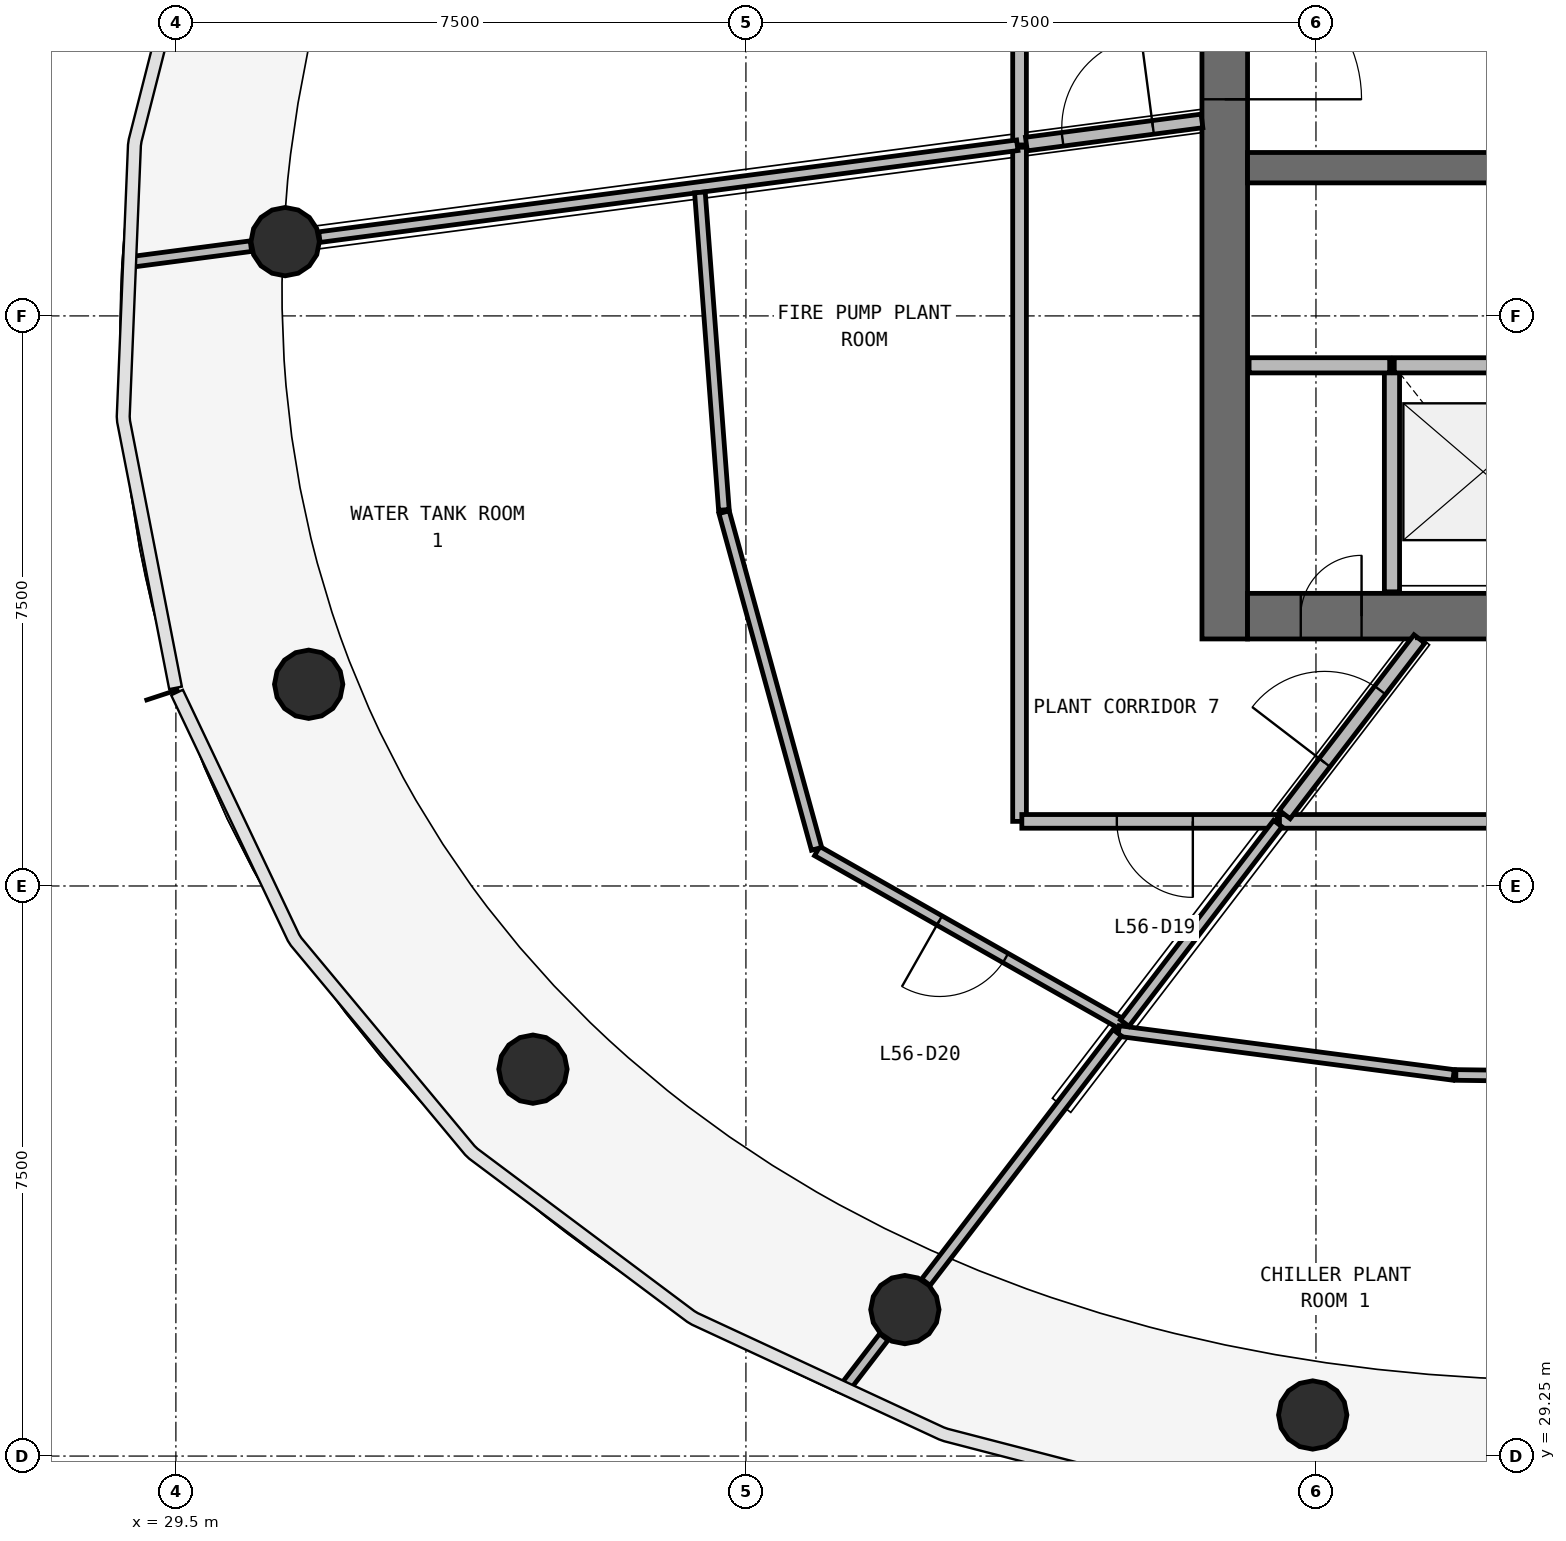
"""IFC4 building model, lengths in metres.
Left out: names, types, materials, properties, quantities, classifications, styles, units other than length and angle.
Written with IfcOpenShell. Run it as: python <this file> out.ifc"""

import sys

from ifc_helpers import new_model, si_unit, direction, frame, frame_2d, origin, origin_2d, place, context, subcontext, project, spatial, rectangle, circle, extrude, source, transform, mapped, element, fill, save


model = new_model("IFC4")
c1 = context("Model", 3, precision=1e-05, world=origin(), true_north=direction((0.0, 1.0)))
c2 = subcontext(c1, "Body", "Model", "MODEL_VIEW")
j1 = project(units=[si_unit("LENGTHUNIT", "METRE"), si_unit("PLANEANGLEUNIT", "RADIAN")], contexts=[c1])
p1 = place(None, origin())
s1 = spatial("IfcSite", under=j1, at=p1, CompositionType="ELEMENT")
p2 = place(p1, origin())
s2 = spatial("IfcBuilding", under=s1, at=p2, CompositionType="ELEMENT")
p3 = place(p2, frame((0.0, 0.0, 230.6)))
s3 = spatial("IfcBuildingStorey", under=s2, at=p3, CompositionType="ELEMENT", Elevation=230.6)
p4 = place(p3, frame((43.3, 56.0, 0.0), z_axis=(0.0, 0.0, 1.0), x_axis=(0.0, -1.0, 0.0)))
e1 = element("IfcWall", 1, at=p4, inside=s3, PredefinedType="SHEAR", context=c2, shape_type="SweptSolid", body=[
    extrude(rectangle(XDim=16.0, YDim=0.6, at=frame_2d((8.0, 0.0))), origin(), (0.0, 0.0, 1.0), 3.9),
])
p5 = place(p4, frame((7.1, 0.0, 0.0)))
e2 = element("IfcOpeningElement", 2, at=p5, cuts=e1, PredefinedType="OPENING", context=c2, shape_type="SweptSolid", body=[
    extrude(rectangle(XDim=1.8, YDim=2.1, at=frame_2d((0.9, 1.05))), frame((0.0, 0.31, 0.0), z_axis=(0.0, -1.0, 0.0), x_axis=(1.0, 0.0, 0.0)), (0.0, 0.0, 1.0), 0.62),
])
p6 = place(p3, frame((43.6, 40.3, 0.0), z_axis=(0.0, 0.0, 1.0), x_axis=(1.0, 0.0, 0.0)))
e3 = element("IfcWall", 3, at=p6, inside=s3, PredefinedType="SHEAR", context=c2, shape_type="SweptSolid", body=[
    extrude(rectangle(XDim=16.8, YDim=0.6, at=frame_2d((8.4, 0.0))), origin(), (0.0, 0.0, 1.0), 3.9),
])
p7 = place(p6, frame((10.3, 0.0, 0.0)))
e4 = element("IfcOpeningElement", 4, at=p7, cuts=e3, PredefinedType="OPENING", context=c2, shape_type="SweptSolid", body=[
    extrude(rectangle(XDim=1.2, YDim=2.1, at=frame_2d((0.6, 1.05))), frame((0.0, 0.31, 0.0), z_axis=(0.0, -1.0, 0.0), x_axis=(1.0, 0.0, 0.0)), (0.0, 0.0, 1.0), 0.62),
])
p8 = place(p6, frame((7.25, 0.0, 0.0)))
e5 = element("IfcOpeningElement", 5, at=p8, cuts=e3, PredefinedType="OPENING", context=c2, shape_type="SweptSolid", body=[
    extrude(rectangle(XDim=1.1, YDim=2.1, at=frame_2d((0.55, 1.05))), frame((0.0, 0.31, 0.0), z_axis=(0.0, -1.0, 0.0), x_axis=(1.0, 0.0, 0.0)), (0.0, 0.0, 1.0), 0.62),
])
p9 = place(p6, frame((0.7, 0.0, 0.0)))
e6 = element("IfcOpeningElement", 6, at=p9, cuts=e3, PredefinedType="OPENING", context=c2, shape_type="SweptSolid", body=[
    extrude(rectangle(XDim=0.8, YDim=2.1, at=frame_2d((0.4, 1.05))), frame((0.0, 0.31, 0.0), z_axis=(0.0, -1.0, 0.0), x_axis=(1.0, 0.0, 0.0)), (0.0, 0.0, 1.0), 0.62),
])
p10 = place(p3, frame((43.6, 46.2, 0.0), z_axis=(0.0, 0.0, 1.0), x_axis=(1.0, 0.0, 0.0)))
e7 = element("IfcWall", 7, at=p10, inside=s3, PredefinedType="SHEAR", context=c2, shape_type="SweptSolid", body=[
    extrude(rectangle(XDim=16.8, YDim=0.4, at=frame_2d((8.4, 0.0))), origin(), (0.0, 0.0, 1.0), 3.9),
])
p11 = place(p10, frame((7.85, 0.0, 0.0)))
e8 = element("IfcOpeningElement", 8, at=p11, cuts=e7, PredefinedType="OPENING", context=c2, shape_type="SweptSolid", body=[
    extrude(rectangle(XDim=0.9, YDim=2.1, at=frame_2d((0.45, 1.05))), frame((0.0, 0.21, 0.0), z_axis=(0.0, -1.0, 0.0), x_axis=(1.0, 0.0, 0.0)), (0.0, 0.0, 1.0), 0.42),
])
m1 = source(origin(), c2, "Body", "SweptSolid", [
    extrude(circle(Radius=0.45, at=origin_2d()), origin(), (0.0, 0.0, 1.0), 3.58),
])
for number, where, z_axis, x_axis in (
    (9, (30.938, 45.227, 0.0), (0.0, 0.0, 1.0), (1.0, 0.0, 0.0)),
    (10, (31.247, 39.404, 0.0), (0.0, 0.0, 1.0), (1.0, 0.0, 0.0)),
    (11, (34.198, 34.34, 0.0), (0.0, 0.0, 1.0), (1.0, 0.0, 0.0)),
    (12, (39.091, 31.177, 0.0), (0.0, 0.0, 1.0), (1.0, 0.0, 0.0)),
    (13, (44.457, 29.79, 0.0), (0.0, 0.0, 1.0), (1.0, 0.0, 0.0)),
):
    element("IfcColumn", number, at=place(p3, frame(where, z_axis=z_axis, x_axis=x_axis)), inside=s3, PredefinedType="COLUMN", context=c2, shape_type="MappedRepresentation", body=[
        mapped(m1, transform((0.0, 0.0, 0.0), scale=1.0)),
    ])
p12 = place(p3, frame((45.5, 43.6, 0.0), z_axis=(0.0, 0.0, 1.0), x_axis=(0.0, -1.0, 0.0)))
e14 = element("IfcWall", 14, at=p12, inside=s3, PredefinedType="SOLIDWALL", context=c2, shape_type="SweptSolid", body=[
    extrude(rectangle(XDim=2.98, YDim=0.2, at=frame_2d((1.49, 0.0))), origin(), (0.0, 0.0, 1.0), 3.58),
])
p13 = place(p3, frame((47.87, 43.6, 0.0), z_axis=(0.0, 0.0, 1.0), x_axis=(-1.0, 0.0, 0.0)))
e15 = element("IfcWall", 15, at=p13, inside=s3, PredefinedType="SOLIDWALL", context=c2, shape_type="SweptSolid", body=[
    extrude(rectangle(XDim=2.34, YDim=0.2, at=frame_2d((1.17, 0.0))), origin(), (0.0, 0.0, 1.0), 3.58),
])
p14 = place(p3, frame((45.47, 43.6, 0.0), z_axis=(0.0, 0.0, 1.0), x_axis=(-1.0, 0.0, 0.0)))
e16 = element("IfcWall", 16, at=p14, inside=s3, PredefinedType="SOLIDWALL", context=c2, shape_type="SweptSolid", body=[
    extrude(rectangle(XDim=1.85, YDim=0.2, at=frame_2d((0.925, 0.0))), origin(), (0.0, 0.0, 1.0), 3.58),
])
p15 = place(p3, frame((40.6, 46.499, 0.0), z_axis=(0.0, 0.0, 1.0), x_axis=(0.0, 1.0, 0.0)))
e17 = element("IfcWall", 17, at=p15, inside=s3, PredefinedType="PARTITIONING", context=c2, shape_type="SweptSolid", body=[
    extrude(rectangle(XDim=10.248, YDim=0.18, at=frame_2d((5.124, 0.0))), origin(), (0.0, 0.0, 1.0), 2.38),
])
p16 = place(p15, frame((4.598, 0.0, 0.0)))
e18 = element("IfcOpeningElement", 18, at=p16, cuts=e17, PredefinedType="OPENING", context=c2, shape_type="SweptSolid", body=[
    extrude(rectangle(XDim=1.0, YDim=2.1, at=frame_2d((0.5, 1.05))), frame((0.0, 0.1, 0.0), z_axis=(0.0, -1.0, 0.0), x_axis=(1.0, 0.0, 0.0)), (0.0, 0.0, 1.0), 0.2),
])
p17 = place(p3, frame((53.339, 37.6, 0.0), z_axis=(0.0, 0.0, 1.0), x_axis=(-1.0, 0.0, 0.0)))
e19 = element("IfcWall", 19, at=p17, inside=s3, PredefinedType="PARTITIONING", context=c2, shape_type="SweptSolid", body=[
    extrude(rectangle(XDim=9.319, YDim=0.18, at=frame_2d((4.66, 0.0))), origin(), (0.0, 0.0, 1.0), 2.38),
])
p18 = place(p17, frame((4.069, 0.0, 0.0)))
e20 = element("IfcOpeningElement", 20, at=p18, cuts=e19, PredefinedType="OPENING", context=c2, shape_type="SweptSolid", body=[
    extrude(rectangle(XDim=1.0, YDim=2.1, at=frame_2d((0.5, 1.05))), frame((0.0, 0.1, 0.0), z_axis=(0.0, -1.0, 0.0), x_axis=(1.0, 0.0, 0.0)), (0.0, 0.0, 1.0), 0.2),
])
p19 = place(p3, frame((40.6, 46.469, 0.0), z_axis=(0.0, 0.0, 1.0), x_axis=(0.0, -1.0, 0.0)))
e21 = element("IfcWall", 21, at=p19, inside=s3, PredefinedType="PARTITIONING", context=c2, shape_type="SweptSolid", body=[
    extrude(rectangle(XDim=8.869, YDim=0.18, at=frame_2d((4.435, 0.0))), origin(), (0.0, 0.0, 1.0), 2.38),
])
p20 = place(p3, frame((43.99, 37.6, 0.0), z_axis=(0.0, 0.0, 1.0), x_axis=(-1.0, 0.0, 0.0)))
e22 = element("IfcWall", 22, at=p20, inside=s3, PredefinedType="PARTITIONING", context=c2, shape_type="SweptSolid", body=[
    extrude(rectangle(XDim=3.36, YDim=0.18, at=frame_2d((1.68, 0.0))), origin(), (0.0, 0.0, 1.0), 2.38),
])
p21 = place(p20, frame((1.11, 0.0, 0.0)))
e23 = element("IfcOpeningElement", 23, at=p21, cuts=e22, PredefinedType="OPENING", context=c2, shape_type="SweptSolid", body=[
    extrude(rectangle(XDim=1.0, YDim=2.1, at=frame_2d((0.5, 1.05))), frame((0.0, 0.1, 0.0), z_axis=(0.0, -1.0, 0.0), x_axis=(1.0, 0.0, 0.0)), (0.0, 0.0, 1.0), 0.2),
])
p22 = place(p3, frame((44.089, 37.69, 0.0), z_axis=(0.0, 0.0, 1.0), x_axis=(0.608737787706, 0.793371480341, 0.0)))
e24 = element("IfcWall", 24, at=p22, inside=s3, PredefinedType="PARTITIONING", context=c2, shape_type="SweptSolid", body=[
    extrude(rectangle(XDim=2.912, YDim=0.18, at=frame_2d((1.456, 0.0))), origin(), (0.0, 0.0, 1.0), 2.38),
])
p23 = place(p22, frame((0.862, 0.0, 0.0)))
e25 = element("IfcOpeningElement", 25, at=p23, cuts=e24, PredefinedType="OPENING", context=c2, shape_type="SweptSolid", body=[
    extrude(rectangle(XDim=1.2, YDim=2.1, at=frame_2d((0.6, 1.05))), frame((0.0, 0.1, 0.0), z_axis=(0.0, -1.0, 0.0), x_axis=(1.0, 0.0, 0.0)), (0.0, 0.0, 1.0), 0.2),
])
p24 = place(p3, frame((40.69, 46.511, 0.0), z_axis=(0.0, 0.0, 1.0), x_axis=(0.991440737811, 0.130557509967, 0.0)))
e26 = element("IfcWall", 26, at=p24, inside=s3, PredefinedType="PARTITIONING", context=c2, shape_type="SweptSolid", body=[
    extrude(rectangle(XDim=2.33, YDim=0.18, at=frame_2d((1.165, 0.0))), origin(), (0.0, 0.0, 1.0), 2.38),
])
p25 = place(p24, frame((0.48, 0.0, 0.0)))
e27 = element("IfcOpeningElement", 27, at=p25, cuts=e26, PredefinedType="OPENING", context=c2, shape_type="SweptSolid", body=[
    extrude(rectangle(XDim=1.2, YDim=2.1, at=frame_2d((0.6, 1.05))), frame((0.0, 0.1, 0.0), z_axis=(0.0, -1.0, 0.0), x_axis=(1.0, 0.0, 0.0)), (0.0, 0.0, 1.0), 0.2),
])
p26 = place(p3, frame((40.57, 46.495, 0.0), z_axis=(0.0, 0.0, 1.0), x_axis=(-0.991446397915, -0.130514520502, 0.0)))
e28 = element("IfcWall", 28, at=p26, inside=s3, PredefinedType="PARTITIONING", context=c2, shape_type="SweptSolid", body=[
    extrude(rectangle(XDim=9.261, YDim=0.14, at=frame_2d((4.631, 0.0))), origin(), (0.0, 0.0, 1.0), 2.38),
])
p27 = place(p3, frame((41.965, 34.923, 0.0), z_axis=(0.0, 0.0, 1.0), x_axis=(-0.869576423492, 0.493798383662, 0.0)))
e29 = element("IfcWall", 29, at=p27, inside=s3, PredefinedType="PARTITIONING", context=c2, shape_type="SweptSolid", body=[
    extrude(rectangle(XDim=4.632, YDim=0.14, at=frame_2d((2.316, 0.0))), origin(), (0.0, 0.0, 1.0), 2.38),
])
p28 = place(p27, frame((1.781, 0.0, 0.0)))
e30 = element("IfcOpeningElement", 30, at=p28, cuts=e29, PredefinedType="OPENING", context=c2, shape_type="SweptSolid", body=[
    extrude(rectangle(XDim=1.0, YDim=2.1, at=frame_2d((0.5, 1.05))), frame((0.0, 0.08, 0.0), z_axis=(0.0, -1.0, 0.0), x_axis=(1.0, 0.0, 0.0)), (0.0, 0.0, 1.0), 0.16),
])
p29 = place(p3, frame((36.712, 41.668, 0.0), z_axis=(0.0, 0.0, 1.0), x_axis=(0.265005769804, -0.964246826269, 0.0)))
e31 = element("IfcWall", 31, at=p29, inside=s3, PredefinedType="PARTITIONING", context=c2, shape_type="SweptSolid", body=[
    extrude(rectangle(XDim=4.594, YDim=0.14, at=frame_2d((2.297, 0.0))), origin(), (0.0, 0.0, 1.0), 2.38),
])
p30 = place(p3, frame((41.904, 34.842, 0.0), z_axis=(0.0, 0.0, 1.0), x_axis=(0.991511039877, -0.130022528055, 0.0)))
e32 = element("IfcWall", 32, at=p30, inside=s3, PredefinedType="PARTITIONING", context=c2, shape_type="SweptSolid", body=[
    extrude(rectangle(XDim=4.445, YDim=0.14, at=frame_2d((2.222, 0.0))), origin(), (0.0, 0.0, 1.0), 2.38),
])
p31 = place(p3, frame((36.394, 45.875, 0.0), z_axis=(0.0, 0.0, 1.0), x_axis=(0.075408545523, -0.997152722135, 0.0)))
e33 = element("IfcWall", 33, at=p31, inside=s3, PredefinedType="PARTITIONING", context=c2, shape_type="SweptSolid", body=[
    extrude(rectangle(XDim=4.189, YDim=0.14, at=frame_2d((2.095, 0.0))), origin(), (0.0, 0.0, 1.0), 2.38),
])
p32 = place(p3, frame((39.368, 31.538, 0.0), z_axis=(0.0, 0.0, 1.0), x_axis=(0.608757438712, 0.793356402138, 0.0)))
e34 = element("IfcWall", 34, at=p32, inside=s3, PredefinedType="PARTITIONING", context=c2, shape_type="SweptSolid", body=[
    extrude(rectangle(XDim=4.135, YDim=0.14, at=frame_2d((2.068, 0.0))), origin(), (0.0, 0.0, 1.0), 2.38),
])
p33 = place(p3, frame((46.34, 34.264, 0.0), z_axis=(0.0, 0.0, 1.0), x_axis=(0.999911089098, -0.013334687795, 0.0)))
e35 = element("IfcWall", 35, at=p33, inside=s3, PredefinedType="PARTITIONING", context=c2, shape_type="SweptSolid", body=[
    extrude(rectangle(XDim=3.845, YDim=0.14, at=frame_2d((1.922, 0.0))), origin(), (0.0, 0.0, 1.0), 2.38),
])
p34 = place(p3, frame((41.983, 34.946, 0.0), z_axis=(0.0, 0.0, 1.0), x_axis=(0.608783144395, 0.793336677017, 0.0)))
e36 = element("IfcWall", 36, at=p34, inside=s3, PredefinedType="PARTITIONING", context=c2, shape_type="SweptSolid", body=[
    extrude(rectangle(XDim=3.309, YDim=0.14, at=frame_2d((1.654, 0.0))), origin(), (0.0, 0.0, 1.0), 2.38),
])
p35 = place(p3, frame((30.487, 45.168, 0.0), z_axis=(0.0, 0.0, 1.0), x_axis=(-0.991448052913, -0.130501947779, 0.0)))
e37 = element("IfcWall", 37, at=p35, inside=s3, PredefinedType="PARTITIONING", context=c2, shape_type="SweptSolid", body=[
    extrude(rectangle(XDim=1.598, YDim=0.14, at=frame_2d((0.799, 0.0))), origin(), (0.0, 0.0, 1.0), 2.88),
])
p36 = place(p3, frame((38.814, 30.816, 0.0), z_axis=(0.0, 0.0, 1.0), x_axis=(-0.608636710057, -0.793449024936, 0.0)))
e38 = element("IfcWall", 38, at=p36, inside=s3, PredefinedType="PARTITIONING", context=c2, shape_type="SweptSolid", body=[
    extrude(rectangle(XDim=0.824, YDim=0.14, at=frame_2d((0.412, 0.0))), origin(), (0.0, 0.0, 1.0), 2.88),
])
m2 = source(origin(), c2, "Body", "SweptSolid", [
    extrude(rectangle(XDim=1.8, YDim=2.1, at=frame_2d((0.9, 1.05))), frame((0.0, 0.025, 0.0), z_axis=(0.0, -1.0, 0.0), x_axis=(1.0, 0.0, 0.0)), (0.0, 0.0, 1.0), 0.05),
])
p37 = place(p5, origin())
e39 = element("IfcDoor", 39, at=p37, inside=s3, OperationType="SINGLE_SWING_RIGHT", PredefinedType="DOOR", context=c2, shape_type="MappedRepresentation", body=[
    mapped(m2, transform((0.0, 0.0, 0.0), scale=1.0)),
])
fill(e2, e39)
m3 = source(origin(), c2, "Body", "SweptSolid", [
    extrude(rectangle(XDim=0.8, YDim=2.1, at=frame_2d((0.4, 1.05))), frame((0.0, 0.025, 0.0), z_axis=(0.0, -1.0, 0.0), x_axis=(1.0, 0.0, 0.0)), (0.0, 0.0, 1.0), 0.05),
])
p38 = place(p9, origin())
e40 = element("IfcDoor", 40, at=p38, inside=s3, OperationType="SINGLE_SWING_RIGHT", PredefinedType="DOOR", context=c2, shape_type="MappedRepresentation", body=[
    mapped(m3, transform((0.0, 0.0, 0.0), scale=1.0)),
])
fill(e6, e40)
m4 = source(origin(), c2, "Body", "SweptSolid", [
    extrude(rectangle(XDim=1.0, YDim=2.1, at=frame_2d((0.5, 1.05))), frame((0.0, 0.025, 0.0), z_axis=(0.0, -1.0, 0.0), x_axis=(1.0, 0.0, 0.0)), (0.0, 0.0, 1.0), 0.05),
])
p39 = place(p21, origin())
e41 = element("IfcDoor", 41, at=p39, inside=s3, OperationType="SINGLE_SWING_LEFT", PredefinedType="DOOR", context=c2, shape_type="MappedRepresentation", body=[
    mapped(m4, transform((0.0, 0.0, 0.0), scale=1.0)),
])
fill(e23, e41)
p40 = place(p28, origin())
e42 = element("IfcDoor", 42, at=p40, inside=s3, OperationType="SINGLE_SWING_RIGHT", PredefinedType="DOOR", context=c2, shape_type="MappedRepresentation", body=[
    mapped(m4, transform((0.0, 0.0, 0.0), scale=1.0)),
])
fill(e30, e42)
m5 = source(origin(), c2, "Body", "SweptSolid", [
    extrude(rectangle(XDim=1.2, YDim=2.1, at=frame_2d((0.6, 1.05))), frame((0.0, 0.025, 0.0), z_axis=(0.0, -1.0, 0.0), x_axis=(1.0, 0.0, 0.0)), (0.0, 0.0, 1.0), 0.05),
])
p41 = place(p25, origin())
e43 = element("IfcDoor", 43, at=p41, inside=s3, OperationType="SINGLE_SWING_RIGHT", PredefinedType="DOOR", context=c2, shape_type="MappedRepresentation", body=[
    mapped(m5, transform((0.0, 0.0, 0.0), scale=1.0)),
])
fill(e27, e43)
p42 = place(p23, origin())
e44 = element("IfcDoor", 44, at=p42, inside=s3, OperationType="SINGLE_SWING_LEFT", PredefinedType="DOOR", context=c2, shape_type="MappedRepresentation", body=[
    mapped(m5, transform((0.0, 0.0, 0.0), scale=1.0)),
])
fill(e25, e44)
save(model, sys.argv[1])
